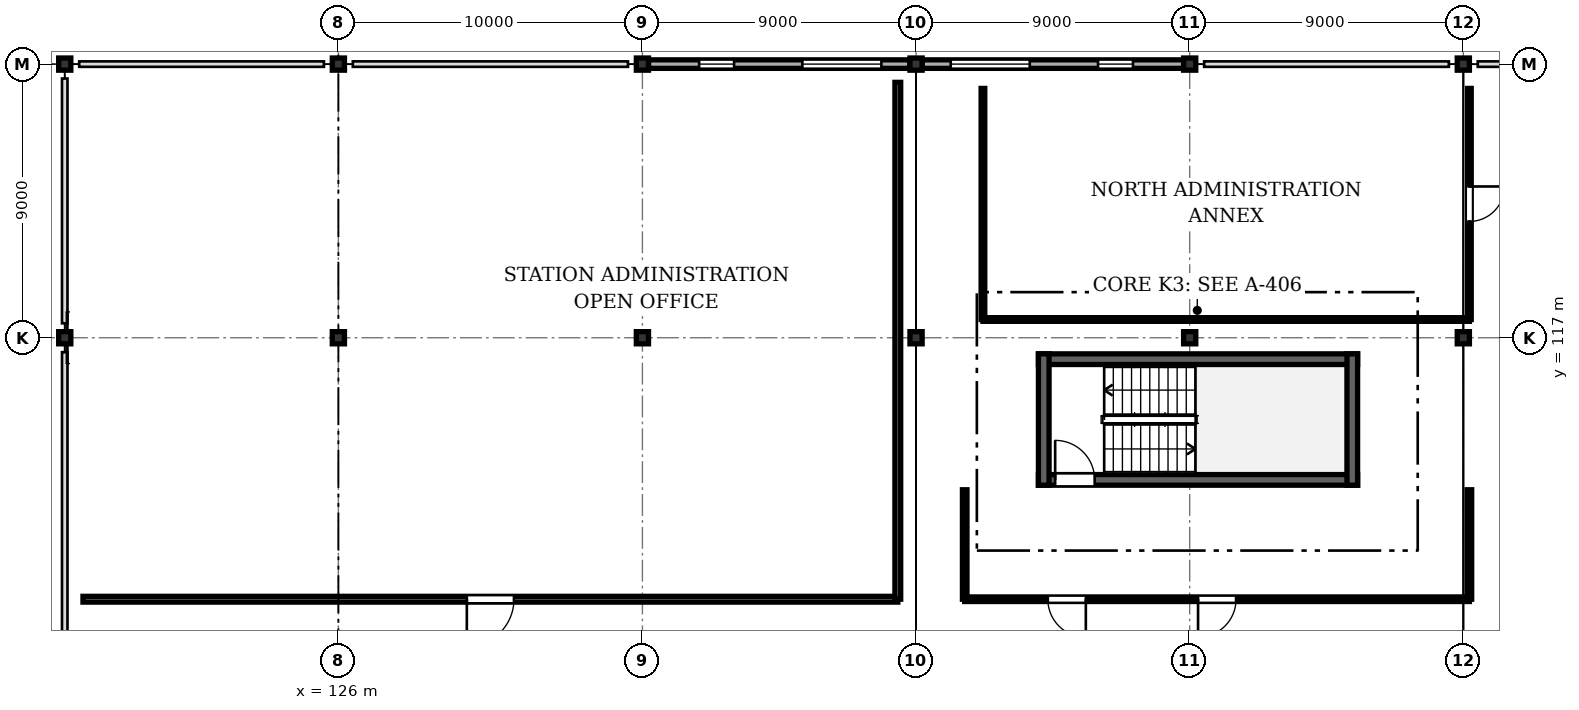
"""IFC4 building model, lengths in metres.
Left out: names, types, materials, properties, quantities, classifications, styles, units other than length and angle.
Written with IfcOpenShell. Run it as: python <this file> out.ifc"""

import sys

from ifc_helpers import new_model, si_unit, direction, frame, frame_2d, origin, origin_2d, place, context, subcontext, project, spatial, rectangle, i_section, extrude, element, fill, save


model = new_model("IFC4")
c1 = context("Model", 3, precision=1e-05, world=origin(), true_north=direction((0.0, 1.0)))
c2 = subcontext(c1, "Body", "Model", "MODEL_VIEW")
j1 = project(units=[si_unit("LENGTHUNIT", "METRE"), si_unit("PLANEANGLEUNIT", "RADIAN")], contexts=[c1])
p1 = place(None, origin())
s1 = spatial("IfcSite", under=j1, at=p1, CompositionType="ELEMENT")
p2 = place(p1, origin())
s2 = spatial("IfcBuilding", under=s1, at=p2, CompositionType="ELEMENT")
p3 = place(p2, frame((0.0, 0.0, 14.4)))
s3 = spatial("IfcBuildingStorey", under=s2, at=p3, CompositionType="ELEMENT", Elevation=14.4)
for number, where, z_axis, x_axis in (
    (1, (117.0, 117.0, 0.0), (0.0, 0.0, 1.0), (1.0, 0.0, 0.0)),
    (2, (117.0, 126.0, 0.0), (0.0, 0.0, 1.0), (1.0, 0.0, 0.0)),
    (3, (126.0, 117.0, 0.0), (0.0, 0.0, 1.0), (1.0, 0.0, 0.0)),
    (4, (126.0, 126.0, 0.0), (0.0, 0.0, 1.0), (1.0, 0.0, 0.0)),
    (5, (136.0, 117.0, 0.0), (0.0, 0.0, 1.0), (1.0, 0.0, 0.0)),
    (6, (136.0, 126.0, 0.0), (0.0, 0.0, 1.0), (1.0, 0.0, 0.0)),
    (7, (145.0, 117.0, 0.0), (0.0, 0.0, 1.0), (1.0, 0.0, 0.0)),
    (8, (145.0, 126.0, 0.0), (0.0, 0.0, 1.0), (1.0, 0.0, 0.0)),
    (9, (154.0, 117.0, 0.0), (0.0, 0.0, 1.0), (1.0, 0.0, 0.0)),
    (10, (154.0, 126.0, 0.0), (0.0, 0.0, 1.0), (1.0, 0.0, 0.0)),
    (11, (163.0, 117.0, 0.0), (0.0, 0.0, 1.0), (1.0, 0.0, 0.0)),
    (12, (163.0, 126.0, 0.0), (0.0, 0.0, 1.0), (1.0, 0.0, 0.0)),
):
    element("IfcColumn", number, at=place(p3, frame(where, z_axis=z_axis, x_axis=x_axis)), inside=s3, PredefinedType="COLUMN", context=c2, shape_type="SweptSolid", body=[
        extrude(i_section(OverallWidth=0.4, OverallDepth=0.4, WebThickness=0.013, FlangeThickness=0.021, FilletRadius=0.022, at=origin_2d()), origin(), (0.0, 0.0, 1.0), 3.2),
    ])
p4 = place(p3, frame((136.2, 126.0, 0.0), z_axis=(0.0, 0.0, 1.0), x_axis=(1.0, 0.0, 0.0)))
e13 = element("IfcWall", 13, at=p4, inside=s3, PredefinedType="SOLIDWALL", context=c2, shape_type="SweptSolid", body=[
    extrude(rectangle(XDim=8.6, YDim=0.28, at=frame_2d((4.3, 0.0))), origin(), (0.0, 0.0, 1.0), 2.515),
])
p5 = place(p4, frame((1.665, 0.0, 0.9)))
e14 = element("IfcOpeningElement", 14, at=p5, cuts=e13, PredefinedType="OPENING", context=c2, shape_type="SweptSolid", body=[
    extrude(rectangle(XDim=1.15, YDim=1.45, at=frame_2d((0.575, 0.725))), frame((0.0, 0.15, 0.0), z_axis=(0.0, -1.0, 0.0), x_axis=(1.0, 0.0, 0.0)), (0.0, 0.0, 1.0), 0.3),
])
p6 = place(p4, frame((5.06, 0.0, 0.9)))
e15 = element("IfcOpeningElement", 15, at=p6, cuts=e13, PredefinedType="OPENING", context=c2, shape_type="SweptSolid", body=[
    extrude(rectangle(XDim=2.6, YDim=1.4, at=frame_2d((1.3, 0.7))), frame((0.0, 0.15, 0.0), z_axis=(0.0, -1.0, 0.0), x_axis=(1.0, 0.0, 0.0)), (0.0, 0.0, 1.0), 0.3),
])
p7 = place(p3, frame((145.2, 126.0, 0.0), z_axis=(0.0, 0.0, 1.0), x_axis=(1.0, 0.0, 0.0)))
e16 = element("IfcWall", 16, at=p7, inside=s3, PredefinedType="SOLIDWALL", context=c2, shape_type="SweptSolid", body=[
    extrude(rectangle(XDim=8.6, YDim=0.28, at=frame_2d((4.3, 0.0))), origin(), (0.0, 0.0, 1.0), 2.515),
])
p8 = place(p7, frame((0.94, 0.0, 0.9)))
e17 = element("IfcOpeningElement", 17, at=p8, cuts=e16, PredefinedType="OPENING", context=c2, shape_type="SweptSolid", body=[
    extrude(rectangle(XDim=2.6, YDim=1.4, at=frame_2d((1.3, 0.7))), frame((0.0, 0.15, 0.0), z_axis=(0.0, -1.0, 0.0), x_axis=(1.0, 0.0, 0.0)), (0.0, 0.0, 1.0), 0.3),
])
p9 = place(p7, frame((5.785, 0.0, 0.9)))
e18 = element("IfcOpeningElement", 18, at=p9, cuts=e16, PredefinedType="OPENING", context=c2, shape_type="SweptSolid", body=[
    extrude(rectangle(XDim=1.15, YDim=1.45, at=frame_2d((0.575, 0.725))), frame((0.0, 0.15, 0.0), z_axis=(0.0, -1.0, 0.0), x_axis=(1.0, 0.0, 0.0)), (0.0, 0.0, 1.0), 0.3),
])
p10 = place(p3, frame((149.025, 112.325, 0.0), z_axis=(0.0, 0.0, 1.0), x_axis=(1.0, 0.0, 0.0)))
e19 = element("IfcWall", 19, at=p10, inside=s3, PredefinedType="SHEAR", context=c2, shape_type="SweptSolid", body=[
    extrude(rectangle(XDim=10.498, YDim=0.35, at=frame_2d((5.249, 0.0))), origin(), (0.0, 0.0, 1.0), 3.0),
])
p11 = place(p10, frame((0.55, 0.0, 0.0)))
e20 = element("IfcOpeningElement", 20, at=p11, cuts=e19, PredefinedType="OPENING", context=c2, shape_type="SweptSolid", body=[
    extrude(rectangle(XDim=1.3, YDim=2.1, at=frame_2d((0.65, 1.05))), frame((0.0, 0.185, 0.0), z_axis=(0.0, -1.0, 0.0), x_axis=(1.0, 0.0, 0.0)), (0.0, 0.0, 1.0), 0.37),
])
p12 = place(p3, frame((159.522, 116.295, 0.0), z_axis=(0.0, 0.0, 1.0), x_axis=(-1.0, 0.0, 0.0)))
e21 = element("IfcWall", 21, at=p12, inside=s3, PredefinedType="SHEAR", context=c2, shape_type="SweptSolid", body=[
    extrude(rectangle(XDim=10.498, YDim=0.35, at=frame_2d((5.249, 0.0))), origin(), (0.0, 0.0, 1.0), 3.0),
])
for number, where, z_axis, x_axis in (
    (22, (159.347, 112.15, 0.0), (0.0, 0.0, 1.0), (0.0, 1.0, 0.0)),
    (23, (149.2, 116.47, 0.0), (0.0, 0.0, 1.0), (0.0, -1.0, 0.0)),
):
    element("IfcWall", number, at=place(p3, frame(where, z_axis=z_axis, x_axis=x_axis)), inside=s3, PredefinedType="SHEAR", context=c2, shape_type="SweptSolid", body=[
        extrude(rectangle(XDim=4.32, YDim=0.35, at=frame_2d((2.16, 0.0))), origin(), (0.0, 0.0, 1.0), 3.0),
    ])
p13 = place(p3, frame((144.4, 108.4, 0.0), z_axis=(0.0, 0.0, 1.0), x_axis=(-1.0, 0.0, 0.0)))
e24 = element("IfcWall", 24, at=p13, inside=s3, PredefinedType="PARTITIONING", context=c2, shape_type="SweptSolid", body=[
    extrude(rectangle(XDim=26.8, YDim=0.19, at=frame_2d((13.4, 0.0))), origin(), (0.0, 0.0, 1.0), 2.375),
])
p14 = place(p13, frame((12.625, 0.0, 0.0)))
e25 = element("IfcOpeningElement", 25, at=p14, cuts=e24, PredefinedType="OPENING", context=c2, shape_type="SweptSolid", body=[
    extrude(rectangle(XDim=1.55, YDim=2.1, at=frame_2d((0.775, 1.05))), frame((0.0, 0.105, 0.0), z_axis=(0.0, -1.0, 0.0), x_axis=(1.0, 0.0, 0.0)), (0.0, 0.0, 1.0), 0.21),
])
p15 = place(p3, frame((144.4, 125.4, 0.0), z_axis=(0.0, 0.0, 1.0), x_axis=(0.0, -1.0, 0.0)))
e26 = element("IfcWall", 26, at=p15, inside=s3, PredefinedType="PARTITIONING", context=c2, shape_type="SweptSolid", body=[
    extrude(rectangle(XDim=17.0, YDim=0.19, at=frame_2d((8.5, 0.0))), origin(), (0.0, 0.0, 1.0), 2.375),
])
p16 = place(p3, frame((163.2, 108.4, 0.0), z_axis=(0.0, 0.0, 1.0), x_axis=(-1.0, 0.0, 0.0)))
e27 = element("IfcWall", 27, at=p16, inside=s3, PredefinedType="PARTITIONING", context=c2, shape_type="SweptSolid", body=[
    extrude(rectangle(XDim=16.6, YDim=0.15, at=frame_2d((8.3, 0.0))), origin(), (0.0, 0.0, 1.0), 2.375),
])
p17 = place(p16, frame((7.675, 0.0, 0.0)))
e28 = element("IfcOpeningElement", 28, at=p17, cuts=e27, PredefinedType="OPENING", context=c2, shape_type="SweptSolid", body=[
    extrude(rectangle(XDim=1.25, YDim=2.1, at=frame_2d((0.625, 1.05))), frame((0.0, 0.085, 0.0), z_axis=(0.0, -1.0, 0.0), x_axis=(1.0, 0.0, 0.0)), (0.0, 0.0, 1.0), 0.17),
])
p18 = place(p16, frame((12.616, 0.0, 0.0)))
e29 = element("IfcOpeningElement", 29, at=p18, cuts=e27, PredefinedType="OPENING", context=c2, shape_type="SweptSolid", body=[
    extrude(rectangle(XDim=1.25, YDim=2.1, at=frame_2d((0.625, 1.05))), frame((0.0, 0.085, 0.0), z_axis=(0.0, -1.0, 0.0), x_axis=(1.0, 0.0, 0.0)), (0.0, 0.0, 1.0), 0.17),
])
p19 = place(p3, frame((146.6, 108.4, 0.0), z_axis=(0.0, 0.0, 1.0), x_axis=(0.0, 1.0, 0.0)))
e30 = element("IfcWall", 30, at=p19, inside=s3, PredefinedType="PARTITIONING", context=c2, shape_type="SweptSolid", body=[
    extrude(rectangle(XDim=3.6, YDim=0.15, at=frame_2d((1.8, 0.0))), origin(), (0.0, 0.0, 1.0), 2.975),
])
p20 = place(p3, frame((163.2, 112.0, 0.0), z_axis=(0.0, 0.0, 1.0), x_axis=(0.0, -1.0, 0.0)))
e31 = element("IfcWall", 31, at=p20, inside=s3, PredefinedType="PARTITIONING", context=c2, shape_type="SweptSolid", body=[
    extrude(rectangle(XDim=3.6, YDim=0.15, at=frame_2d((1.8, 0.0))), origin(), (0.0, 0.0, 1.0), 2.375),
])
p21 = place(p3, frame((163.2, 117.6, 0.0), z_axis=(0.0, 0.0, 1.0), x_axis=(-1.0, 0.0, 0.0)))
e32 = element("IfcWall", 32, at=p21, inside=s3, PredefinedType="PARTITIONING", context=c2, shape_type="SweptSolid", body=[
    extrude(rectangle(XDim=16.0, YDim=0.12, at=frame_2d((8.0, 0.0))), origin(), (0.0, 0.0, 1.0), 2.375),
])
p22 = place(p3, frame((147.2, 117.6, 0.0), z_axis=(0.0, 0.0, 1.0), x_axis=(0.0, 1.0, 0.0)))
e33 = element("IfcWall", 33, at=p22, inside=s3, PredefinedType="PARTITIONING", context=c2, shape_type="SweptSolid", body=[
    extrude(rectangle(XDim=7.6, YDim=0.12, at=frame_2d((3.8, 0.0))), origin(), (0.0, 0.0, 1.0), 2.515),
])
p23 = place(p3, frame((163.2, 125.2, 0.0), z_axis=(0.0, 0.0, 1.0), x_axis=(0.0, -1.0, 0.0)))
e34 = element("IfcWall", 34, at=p23, inside=s3, PredefinedType="PARTITIONING", context=c2, shape_type="SweptSolid", body=[
    extrude(rectangle(XDim=7.6, YDim=0.12, at=frame_2d((3.8, 0.0))), origin(), (0.0, 0.0, 1.0), 2.375),
])
p24 = place(p23, frame((3.225, 0.0, 0.0)))
e35 = element("IfcOpeningElement", 35, at=p24, cuts=e34, PredefinedType="OPENING", context=c2, shape_type="SweptSolid", body=[
    extrude(rectangle(XDim=1.15, YDim=2.1, at=frame_2d((0.575, 1.05))), frame((0.0, 0.07, 0.0), z_axis=(0.0, -1.0, 0.0), x_axis=(1.0, 0.0, 0.0)), (0.0, 0.0, 1.0), 0.14),
])
p25 = place(p5, origin())
e36 = element("IfcWindow", 36, at=p25, inside=s3, PartitioningType="SINGLE_PANEL", PredefinedType="WINDOW", context=c2, shape_type="SweptSolid", body=[
    extrude(rectangle(XDim=1.15, YDim=1.45, at=frame_2d((0.575, 0.725))), frame((0.0, 0.03, 0.0), z_axis=(0.0, -1.0, 0.0), x_axis=(1.0, 0.0, 0.0)), (0.0, 0.0, 1.0), 0.06),
])
fill(e14, e36)
p26 = place(p6, origin())
e37 = element("IfcWindow", 37, at=p26, inside=s3, PartitioningType="SINGLE_PANEL", PredefinedType="WINDOW", context=c2, shape_type="SweptSolid", body=[
    extrude(rectangle(XDim=2.6, YDim=1.4, at=frame_2d((1.3, 0.7))), frame((0.0, 0.03, 0.0), z_axis=(0.0, -1.0, 0.0), x_axis=(1.0, 0.0, 0.0)), (0.0, 0.0, 1.0), 0.06),
])
fill(e15, e37)
p27 = place(p8, origin())
e38 = element("IfcWindow", 38, at=p27, inside=s3, PartitioningType="SINGLE_PANEL", PredefinedType="WINDOW", context=c2, shape_type="SweptSolid", body=[
    extrude(rectangle(XDim=2.6, YDim=1.4, at=frame_2d((1.3, 0.7))), frame((0.0, 0.03, 0.0), z_axis=(0.0, -1.0, 0.0), x_axis=(1.0, 0.0, 0.0)), (0.0, 0.0, 1.0), 0.06),
])
fill(e17, e38)
p28 = place(p9, origin())
e39 = element("IfcWindow", 39, at=p28, inside=s3, PartitioningType="SINGLE_PANEL", PredefinedType="WINDOW", context=c2, shape_type="SweptSolid", body=[
    extrude(rectangle(XDim=1.15, YDim=1.45, at=frame_2d((0.575, 0.725))), frame((0.0, 0.03, 0.0), z_axis=(0.0, -1.0, 0.0), x_axis=(1.0, 0.0, 0.0)), (0.0, 0.0, 1.0), 0.06),
])
fill(e18, e39)
p29 = place(p11, origin())
e40 = element("IfcDoor", 40, at=p29, inside=s3, OperationType="SINGLE_SWING_LEFT", PredefinedType="DOOR", context=c2, shape_type="SweptSolid", body=[
    extrude(rectangle(XDim=1.3, YDim=2.1, at=frame_2d((0.65, 1.05))), frame((0.0, 0.025, 0.0), z_axis=(0.0, -1.0, 0.0), x_axis=(1.0, 0.0, 0.0)), (0.0, 0.0, 1.0), 0.05),
])
fill(e20, e40)
p30 = place(p14, origin())
e41 = element("IfcDoor", 41, at=p30, inside=s3, OperationType="SINGLE_SWING_RIGHT", PredefinedType="DOOR", context=c2, shape_type="SweptSolid", body=[
    extrude(rectangle(XDim=1.55, YDim=2.1, at=frame_2d((0.775, 1.05))), frame((0.0, 0.025, 0.0), z_axis=(0.0, -1.0, 0.0), x_axis=(1.0, 0.0, 0.0)), (0.0, 0.0, 1.0), 0.05),
])
fill(e25, e41)
p31 = place(p17, origin())
e42 = element("IfcDoor", 42, at=p31, inside=s3, OperationType="SINGLE_SWING_RIGHT", PredefinedType="DOOR", context=c2, shape_type="SweptSolid", body=[
    extrude(rectangle(XDim=1.25, YDim=2.1, at=frame_2d((0.625, 1.05))), frame((0.0, 0.025, 0.0), z_axis=(0.0, -1.0, 0.0), x_axis=(1.0, 0.0, 0.0)), (0.0, 0.0, 1.0), 0.05),
])
fill(e28, e42)
p32 = place(p18, origin())
e43 = element("IfcDoor", 43, at=p32, inside=s3, OperationType="SINGLE_SWING_LEFT", PredefinedType="DOOR", context=c2, shape_type="SweptSolid", body=[
    extrude(rectangle(XDim=1.25, YDim=2.1, at=frame_2d((0.625, 1.05))), frame((0.0, 0.025, 0.0), z_axis=(0.0, -1.0, 0.0), x_axis=(1.0, 0.0, 0.0)), (0.0, 0.0, 1.0), 0.05),
])
fill(e29, e43)
p33 = place(p24, origin())
e44 = element("IfcDoor", 44, at=p33, inside=s3, OperationType="SINGLE_SWING_LEFT", PredefinedType="DOOR", context=c2, shape_type="SweptSolid", body=[
    extrude(rectangle(XDim=1.15, YDim=2.1, at=frame_2d((0.575, 1.05))), frame((0.0, 0.025, 0.0), z_axis=(0.0, -1.0, 0.0), x_axis=(1.0, 0.0, 0.0)), (0.0, 0.0, 1.0), 0.05),
])
fill(e35, e44)
save(model, sys.argv[1])
